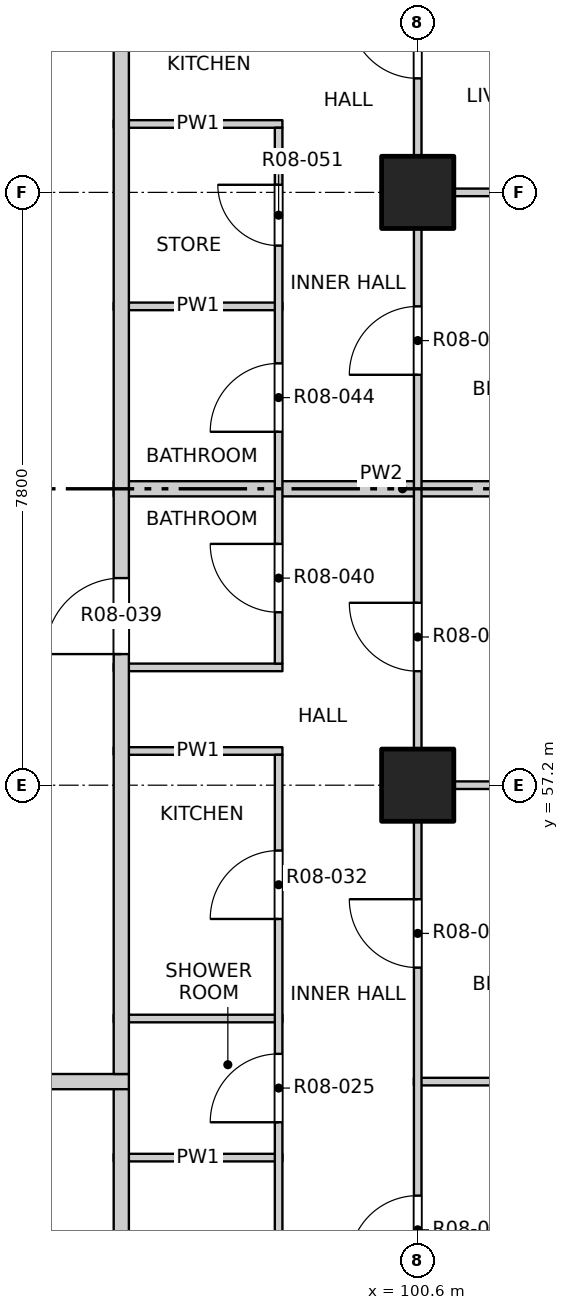
"""IFC4 building model, lengths in metres.
Left out: names, types, materials, properties, quantities, classifications, styles, units other than length and angle.
Written with IfcOpenShell. Run it as: python <this file> out.ifc"""

import sys

from ifc_helpers import new_model, si_unit, direction, frame, frame_2d, origin, origin_2d, place, context, subcontext, project, spatial, rectangle, extrude, element, fill, save


model = new_model("IFC4")
c1 = context("Model", 3, precision=1e-05, world=origin(), true_north=direction((0.0, 1.0)))
c2 = subcontext(c1, "Body", "Model", "MODEL_VIEW")
j1 = project(units=[si_unit("LENGTHUNIT", "METRE"), si_unit("PLANEANGLEUNIT", "RADIAN")], contexts=[c1])
p1 = place(None, origin())
s1 = spatial("IfcSite", under=j1, at=p1, CompositionType="ELEMENT")
p2 = place(p1, origin())
s2 = spatial("IfcBuilding", under=s1, at=p2, CompositionType="ELEMENT")
p3 = place(p2, frame((0.0, 0.0, 99.9)))
s3 = spatial("IfcBuildingStorey", under=s2, at=p3, CompositionType="ELEMENT", Elevation=99.9)
for number, where, z_axis, x_axis in (
    (1, (100.6, 57.2, -0.3), (0.0, 0.0, 1.0), (1.0, 0.0, 0.0)),
    (2, (100.6, 65.0, -0.3), (0.0, 0.0, 1.0), (1.0, 0.0, 0.0)),
):
    element("IfcColumn", number, at=place(p3, frame(where, z_axis=z_axis, x_axis=x_axis)), inside=s3, PredefinedType="COLUMN", context=c2, shape_type="SweptSolid", body=[
        extrude(rectangle(XDim=0.95, YDim=0.95, at=origin_2d()), origin(), (0.0, 0.0, 1.0), 3.45),
    ])
p4 = place(p3, frame((96.6, 52.3, 0.0), z_axis=(0.0, 0.0, 1.0), x_axis=(1.0, 0.0, 0.0)))
e3 = element("IfcWall", 3, at=p4, inside=s3, PredefinedType="PARTITIONING", context=c2, shape_type="SweptSolid", body=[
    extrude(rectangle(XDim=2.22, YDim=0.1, at=frame_2d((1.11, 0.0))), origin(), (0.0, 0.0, 1.0), 3.15),
])
p5 = place(p3, frame((73.2, 53.3, 0.0), z_axis=(0.0, 0.0, 1.0), x_axis=(1.0, 0.0, 0.0)))
e4 = element("IfcWall", 4, at=p5, inside=s3, PredefinedType="PARTITIONING", context=c2, shape_type="SweptSolid", body=[
    extrude(rectangle(XDim=23.6, YDim=0.2, at=frame_2d((11.8, 0.0))), origin(), (0.0, 0.0, 1.0), 3.15),
])
p6 = place(p5, frame((5.975, 0.0, 0.0)))
e5 = element("IfcOpeningElement", 5, at=p6, cuts=e4, PredefinedType="OPENING", context=c2, shape_type="SweptSolid", body=[
    extrude(rectangle(XDim=1.0, YDim=2.1, at=frame_2d((0.5, 1.05))), frame((0.0, 0.11, 0.0), z_axis=(0.0, -1.0, 0.0), x_axis=(1.0, 0.0, 0.0)), (0.0, 0.0, 1.0), 0.22),
])
p7 = place(p5, frame((18.075, 0.0, 0.0)))
e6 = element("IfcOpeningElement", 6, at=p7, cuts=e4, PredefinedType="OPENING", context=c2, shape_type="SweptSolid", body=[
    extrude(rectangle(XDim=1.0, YDim=2.1, at=frame_2d((0.5, 1.05))), frame((0.0, 0.11, 0.0), z_axis=(0.0, -1.0, 0.0), x_axis=(1.0, 0.0, 0.0)), (0.0, 0.0, 1.0), 0.22),
])
p8 = place(p3, frame((100.55, 53.3, 0.0), z_axis=(0.0, 0.0, 1.0), x_axis=(1.0, 0.0, 0.0)))
e7 = element("IfcWall", 7, at=p8, inside=s3, PredefinedType="PARTITIONING", context=c2, shape_type="SweptSolid", body=[
    extrude(rectangle(XDim=3.65, YDim=0.1, at=frame_2d((1.825, 0.0))), origin(), (0.0, 0.0, 1.0), 3.15),
])
p9 = place(p3, frame((96.6, 54.13, 0.0), z_axis=(0.0, 0.0, 1.0), x_axis=(1.0, 0.0, 0.0)))
e8 = element("IfcWall", 8, at=p9, inside=s3, PredefinedType="PARTITIONING", context=c2, shape_type="SweptSolid", body=[
    extrude(rectangle(XDim=2.22, YDim=0.1, at=frame_2d((1.11, 0.0))), origin(), (0.0, 0.0, 1.0), 3.15),
])
p10 = place(p3, frame((100.55, 57.2, 0.0), z_axis=(0.0, 0.0, 1.0), x_axis=(1.0, 0.0, 0.0)))
e9 = element("IfcWall", 9, at=p10, inside=s3, PredefinedType="PARTITIONING", context=c2, shape_type="SweptSolid", body=[
    extrude(rectangle(XDim=3.65, YDim=0.1, at=frame_2d((1.825, 0.0))), origin(), (0.0, 0.0, 1.0), 3.15),
])
for number, where, z_axis, x_axis in (
    (10, (96.6, 57.65, 0.0), (0.0, 0.0, 1.0), (1.0, 0.0, 0.0)),
    (11, (96.6, 58.75, 0.0), (0.0, 0.0, 1.0), (1.0, 0.0, 0.0)),
):
    element("IfcWall", number, at=place(p3, frame(where, z_axis=z_axis, x_axis=x_axis)), inside=s3, PredefinedType="PARTITIONING", context=c2, shape_type="SweptSolid", body=[
        extrude(rectangle(XDim=2.22, YDim=0.1, at=frame_2d((1.11, 0.0))), origin(), (0.0, 0.0, 1.0), 3.15),
    ])
p11 = place(p3, frame((96.6, 61.1, 0.0), z_axis=(0.0, 0.0, 1.0), x_axis=(1.0, 0.0, 0.0)))
e12 = element("IfcWall", 12, at=p11, inside=s3, PredefinedType="PARTITIONING", context=c2, shape_type="SweptSolid", body=[
    extrude(rectangle(XDim=7.6, YDim=0.2, at=frame_2d((3.8, 0.0))), origin(), (0.0, 0.0, 1.0), 2.55),
])
p12 = place(p3, frame((96.6, 63.5, 0.0), z_axis=(0.0, 0.0, 1.0), x_axis=(1.0, 0.0, 0.0)))
e13 = element("IfcWall", 13, at=p12, inside=s3, PredefinedType="PARTITIONING", context=c2, shape_type="SweptSolid", body=[
    extrude(rectangle(XDim=2.22, YDim=0.1, at=frame_2d((1.11, 0.0))), origin(), (0.0, 0.0, 1.0), 3.15),
])
p13 = place(p3, frame((100.55, 65.0, 0.0), z_axis=(0.0, 0.0, 1.0), x_axis=(1.0, 0.0, 0.0)))
e14 = element("IfcWall", 14, at=p13, inside=s3, PredefinedType="PARTITIONING", context=c2, shape_type="SweptSolid", body=[
    extrude(rectangle(XDim=3.65, YDim=0.1, at=frame_2d((1.825, 0.0))), origin(), (0.0, 0.0, 1.0), 3.15),
])
p14 = place(p3, frame((96.6, 65.9, 0.0), z_axis=(0.0, 0.0, 1.0), x_axis=(1.0, 0.0, 0.0)))
e15 = element("IfcWall", 15, at=p14, inside=s3, PredefinedType="PARTITIONING", context=c2, shape_type="SweptSolid", body=[
    extrude(rectangle(XDim=2.22, YDim=0.1, at=frame_2d((1.11, 0.0))), origin(), (0.0, 0.0, 1.0), 3.15),
])
p15 = place(p3, frame((96.7, 45.8, 0.0), z_axis=(0.0, 0.0, 1.0), x_axis=(0.0, 1.0, 0.0)))
e16 = element("IfcWall", 16, at=p15, inside=s3, PredefinedType="PARTITIONING", context=c2, shape_type="SweptSolid", body=[
    extrude(rectangle(XDim=7.4, YDim=0.2, at=frame_2d((3.7, 0.0))), origin(), (0.0, 0.0, 1.0), 3.15),
])
p16 = place(p3, frame((96.7, 53.4, 0.0), z_axis=(0.0, 0.0, 1.0), x_axis=(0.0, 1.0, 0.0)))
e17 = element("IfcWall", 17, at=p16, inside=s3, PredefinedType="PARTITIONING", context=c2, shape_type="SweptSolid", body=[
    extrude(rectangle(XDim=30.8, YDim=0.2, at=frame_2d((15.4, 0.0))), origin(), (0.0, 0.0, 1.0), 3.15),
])
p17 = place(p16, frame((5.525, 0.0, 0.0)))
e18 = element("IfcOpeningElement", 18, at=p17, cuts=e17, PredefinedType="OPENING", context=c2, shape_type="SweptSolid", body=[
    extrude(rectangle(XDim=1.0, YDim=2.1, at=frame_2d((0.5, 1.05))), frame((0.0, 0.11, 0.0), z_axis=(0.0, -1.0, 0.0), x_axis=(1.0, 0.0, 0.0)), (0.0, 0.0, 1.0), 0.22),
])
p18 = place(p16, frame((13.775, 0.0, 0.0)))
e19 = element("IfcOpeningElement", 19, at=p18, cuts=e17, PredefinedType="OPENING", context=c2, shape_type="SweptSolid", body=[
    extrude(rectangle(XDim=1.0, YDim=2.1, at=frame_2d((0.5, 1.05))), frame((0.0, 0.11, 0.0), z_axis=(0.0, -1.0, 0.0), x_axis=(1.0, 0.0, 0.0)), (0.0, 0.0, 1.0), 0.22),
])
p19 = place(p16, frame((22.125, 0.0, 0.0)))
e20 = element("IfcOpeningElement", 20, at=p19, cuts=e17, PredefinedType="OPENING", context=c2, shape_type="SweptSolid", body=[
    extrude(rectangle(XDim=1.0, YDim=2.1, at=frame_2d((0.5, 1.05))), frame((0.0, 0.11, 0.0), z_axis=(0.0, -1.0, 0.0), x_axis=(1.0, 0.0, 0.0)), (0.0, 0.0, 1.0), 0.22),
])
p20 = place(p3, frame((98.77, 49.45, 0.0), z_axis=(0.0, 0.0, 1.0), x_axis=(0.0, 1.0, 0.0)))
e21 = element("IfcWall", 21, at=p20, inside=s3, PredefinedType="PARTITIONING", context=c2, shape_type="SweptSolid", body=[
    extrude(rectangle(XDim=8.15, YDim=0.1, at=frame_2d((4.075, 0.0))), origin(), (0.0, 0.0, 1.0), 3.15),
])
p21 = place(p20, frame((1.0, 0.0, 0.0)))
e22 = element("IfcOpeningElement", 22, at=p21, cuts=e21, PredefinedType="OPENING", context=c2, shape_type="SweptSolid", body=[
    extrude(rectangle(XDim=0.8, YDim=2.1, at=frame_2d((0.4, 1.05))), frame((0.0, 0.06, 0.0), z_axis=(0.0, -1.0, 0.0), x_axis=(1.0, 0.0, 0.0)), (0.0, 0.0, 1.0), 0.12),
])
p22 = place(p20, frame((3.315, 0.0, 0.0)))
e23 = element("IfcOpeningElement", 23, at=p22, cuts=e21, PredefinedType="OPENING", context=c2, shape_type="SweptSolid", body=[
    extrude(rectangle(XDim=0.9, YDim=2.1, at=frame_2d((0.45, 1.05))), frame((0.0, 0.06, 0.0), z_axis=(0.0, -1.0, 0.0), x_axis=(1.0, 0.0, 0.0)), (0.0, 0.0, 1.0), 0.12),
])
p23 = place(p20, frame((5.99, 0.0, 0.0)))
e24 = element("IfcOpeningElement", 24, at=p23, cuts=e21, PredefinedType="OPENING", context=c2, shape_type="SweptSolid", body=[
    extrude(rectangle(XDim=0.9, YDim=2.1, at=frame_2d((0.45, 1.05))), frame((0.0, 0.06, 0.0), z_axis=(0.0, -1.0, 0.0), x_axis=(1.0, 0.0, 0.0)), (0.0, 0.0, 1.0), 0.12),
])
p24 = place(p3, frame((98.77, 58.8, 0.0), z_axis=(0.0, 0.0, 1.0), x_axis=(0.0, 1.0, 0.0)))
e25 = element("IfcWall", 25, at=p24, inside=s3, PredefinedType="PARTITIONING", context=c2, shape_type="SweptSolid", body=[
    extrude(rectangle(XDim=7.05, YDim=0.1, at=frame_2d((3.525, 0.0))), origin(), (0.0, 0.0, 1.0), 3.15),
])
p25 = place(p24, frame((0.675, 0.0, 0.0)))
e26 = element("IfcOpeningElement", 26, at=p25, cuts=e25, PredefinedType="OPENING", context=c2, shape_type="SweptSolid", body=[
    extrude(rectangle(XDim=0.9, YDim=2.1, at=frame_2d((0.45, 1.05))), frame((0.0, 0.06, 0.0), z_axis=(0.0, -1.0, 0.0), x_axis=(1.0, 0.0, 0.0)), (0.0, 0.0, 1.0), 0.12),
])
p26 = place(p24, frame((3.05, 0.0, 0.0)))
e27 = element("IfcOpeningElement", 27, at=p26, cuts=e25, PredefinedType="OPENING", context=c2, shape_type="SweptSolid", body=[
    extrude(rectangle(XDim=0.9, YDim=2.1, at=frame_2d((0.45, 1.05))), frame((0.0, 0.06, 0.0), z_axis=(0.0, -1.0, 0.0), x_axis=(1.0, 0.0, 0.0)), (0.0, 0.0, 1.0), 0.12),
])
p27 = place(p24, frame((5.5, 0.0, 0.0)))
e28 = element("IfcOpeningElement", 28, at=p27, cuts=e25, PredefinedType="OPENING", context=c2, shape_type="SweptSolid", body=[
    extrude(rectangle(XDim=0.8, YDim=2.1, at=frame_2d((0.4, 1.05))), frame((0.0, 0.06, 0.0), z_axis=(0.0, -1.0, 0.0), x_axis=(1.0, 0.0, 0.0)), (0.0, 0.0, 1.0), 0.12),
])
p28 = place(p3, frame((100.6, 45.8, 0.0), z_axis=(0.0, 0.0, 1.0), x_axis=(0.0, 1.0, 0.0)))
e29 = element("IfcWall", 29, at=p28, inside=s3, PredefinedType="PARTITIONING", context=c2, shape_type="SweptSolid", body=[
    extrude(rectangle(XDim=38.4, YDim=0.1, at=frame_2d((19.2, 0.0))), origin(), (0.0, 0.0, 1.0), 3.15),
])
p29 = place(p28, frame((1.05, 0.0, 0.0)))
e30 = element("IfcOpeningElement", 30, at=p29, cuts=e29, PredefinedType="OPENING", context=c2, shape_type="SweptSolid", body=[
    extrude(rectangle(XDim=1.2, YDim=2.1, at=frame_2d((0.6, 1.05))), frame((0.0, 0.06, 0.0), z_axis=(0.0, -1.0, 0.0), x_axis=(1.0, 0.0, 0.0)), (0.0, 0.0, 1.0), 0.12),
])
p30 = place(p28, frame((5.1, 0.0, 0.0)))
e31 = element("IfcOpeningElement", 31, at=p30, cuts=e29, PredefinedType="OPENING", context=c2, shape_type="SweptSolid", body=[
    extrude(rectangle(XDim=0.9, YDim=2.1, at=frame_2d((0.45, 1.05))), frame((0.0, 0.06, 0.0), z_axis=(0.0, -1.0, 0.0), x_axis=(1.0, 0.0, 0.0)), (0.0, 0.0, 1.0), 0.12),
])
p31 = place(p28, frame((9.0, 0.0, 0.0)))
e32 = element("IfcOpeningElement", 32, at=p31, cuts=e29, PredefinedType="OPENING", context=c2, shape_type="SweptSolid", body=[
    extrude(rectangle(XDim=0.9, YDim=2.1, at=frame_2d((0.45, 1.05))), frame((0.0, 0.06, 0.0), z_axis=(0.0, -1.0, 0.0), x_axis=(1.0, 0.0, 0.0)), (0.0, 0.0, 1.0), 0.12),
])
p32 = place(p28, frame((12.9, 0.0, 0.0)))
e33 = element("IfcOpeningElement", 33, at=p32, cuts=e29, PredefinedType="OPENING", context=c2, shape_type="SweptSolid", body=[
    extrude(rectangle(XDim=0.9, YDim=2.1, at=frame_2d((0.45, 1.05))), frame((0.0, 0.06, 0.0), z_axis=(0.0, -1.0, 0.0), x_axis=(1.0, 0.0, 0.0)), (0.0, 0.0, 1.0), 0.12),
])
p33 = place(p28, frame((16.8, 0.0, 0.0)))
e34 = element("IfcOpeningElement", 34, at=p33, cuts=e29, PredefinedType="OPENING", context=c2, shape_type="SweptSolid", body=[
    extrude(rectangle(XDim=0.9, YDim=2.1, at=frame_2d((0.45, 1.05))), frame((0.0, 0.06, 0.0), z_axis=(0.0, -1.0, 0.0), x_axis=(1.0, 0.0, 0.0)), (0.0, 0.0, 1.0), 0.12),
])
p34 = place(p28, frame((20.7, 0.0, 0.0)))
e35 = element("IfcOpeningElement", 35, at=p34, cuts=e29, PredefinedType="OPENING", context=c2, shape_type="SweptSolid", body=[
    extrude(rectangle(XDim=0.9, YDim=2.1, at=frame_2d((0.45, 1.05))), frame((0.0, 0.06, 0.0), z_axis=(0.0, -1.0, 0.0), x_axis=(1.0, 0.0, 0.0)), (0.0, 0.0, 1.0), 0.12),
])
p35 = place(p28, frame((24.6, 0.0, 0.0)))
e36 = element("IfcOpeningElement", 36, at=p35, cuts=e29, PredefinedType="OPENING", context=c2, shape_type="SweptSolid", body=[
    extrude(rectangle(XDim=0.9, YDim=2.1, at=frame_2d((0.45, 1.05))), frame((0.0, 0.06, 0.0), z_axis=(0.0, -1.0, 0.0), x_axis=(1.0, 0.0, 0.0)), (0.0, 0.0, 1.0), 0.12),
])
p36 = place(p28, frame((28.5, 0.0, 0.0)))
e37 = element("IfcOpeningElement", 37, at=p36, cuts=e29, PredefinedType="OPENING", context=c2, shape_type="SweptSolid", body=[
    extrude(rectangle(XDim=0.9, YDim=2.1, at=frame_2d((0.45, 1.05))), frame((0.0, 0.06, 0.0), z_axis=(0.0, -1.0, 0.0), x_axis=(1.0, 0.0, 0.0)), (0.0, 0.0, 1.0), 0.12),
])
p37 = place(p28, frame((32.4, 0.0, 0.0)))
e38 = element("IfcOpeningElement", 38, at=p37, cuts=e29, PredefinedType="OPENING", context=c2, shape_type="SweptSolid", body=[
    extrude(rectangle(XDim=0.9, YDim=2.1, at=frame_2d((0.45, 1.05))), frame((0.0, 0.06, 0.0), z_axis=(0.0, -1.0, 0.0), x_axis=(1.0, 0.0, 0.0)), (0.0, 0.0, 1.0), 0.12),
])
p38 = place(p28, frame((36.15, 0.0, 0.0)))
e39 = element("IfcOpeningElement", 39, at=p38, cuts=e29, PredefinedType="OPENING", context=c2, shape_type="SweptSolid", body=[
    extrude(rectangle(XDim=1.2, YDim=2.1, at=frame_2d((0.6, 1.05))), frame((0.0, 0.06, 0.0), z_axis=(0.0, -1.0, 0.0), x_axis=(1.0, 0.0, 0.0)), (0.0, 0.0, 1.0), 0.12),
])
p39 = place(p30, origin())
e40 = element("IfcDoor", 40, at=p39, inside=s3, OperationType="SINGLE_SWING_LEFT", PredefinedType="DOOR", context=c2, shape_type="SweptSolid", body=[
    extrude(rectangle(XDim=0.9, YDim=2.1, at=frame_2d((0.45, 1.05))), frame((0.0, 0.025, 0.0), z_axis=(0.0, -1.0, 0.0), x_axis=(1.0, 0.0, 0.0)), (0.0, 0.0, 1.0), 0.05),
])
fill(e31, e40)
p40 = place(p22, origin())
e41 = element("IfcDoor", 41, at=p40, inside=s3, OperationType="SINGLE_SWING_LEFT", PredefinedType="DOOR", context=c2, shape_type="SweptSolid", body=[
    extrude(rectangle(XDim=0.9, YDim=2.1, at=frame_2d((0.45, 1.05))), frame((0.0, 0.025, 0.0), z_axis=(0.0, -1.0, 0.0), x_axis=(1.0, 0.0, 0.0)), (0.0, 0.0, 1.0), 0.05),
])
fill(e23, e41)
p41 = place(p31, origin())
e42 = element("IfcDoor", 42, at=p41, inside=s3, OperationType="SINGLE_SWING_RIGHT", PredefinedType="DOOR", context=c2, shape_type="SweptSolid", body=[
    extrude(rectangle(XDim=0.9, YDim=2.1, at=frame_2d((0.45, 1.05))), frame((0.0, 0.025, 0.0), z_axis=(0.0, -1.0, 0.0), x_axis=(1.0, 0.0, 0.0)), (0.0, 0.0, 1.0), 0.05),
])
fill(e32, e42)
p42 = place(p23, origin())
e43 = element("IfcDoor", 43, at=p42, inside=s3, OperationType="SINGLE_SWING_LEFT", PredefinedType="DOOR", context=c2, shape_type="SweptSolid", body=[
    extrude(rectangle(XDim=0.9, YDim=2.1, at=frame_2d((0.45, 1.05))), frame((0.0, 0.025, 0.0), z_axis=(0.0, -1.0, 0.0), x_axis=(1.0, 0.0, 0.0)), (0.0, 0.0, 1.0), 0.05),
])
fill(e24, e43)
p43 = place(p32, origin())
e44 = element("IfcDoor", 44, at=p43, inside=s3, OperationType="SINGLE_SWING_RIGHT", PredefinedType="DOOR", context=c2, shape_type="SweptSolid", body=[
    extrude(rectangle(XDim=0.9, YDim=2.1, at=frame_2d((0.45, 1.05))), frame((0.0, 0.025, 0.0), z_axis=(0.0, -1.0, 0.0), x_axis=(1.0, 0.0, 0.0)), (0.0, 0.0, 1.0), 0.05),
])
fill(e33, e44)
p44 = place(p17, origin())
e45 = element("IfcDoor", 45, at=p44, inside=s3, OperationType="SINGLE_SWING_LEFT", PredefinedType="DOOR", context=c2, shape_type="SweptSolid", body=[
    extrude(rectangle(XDim=1.0, YDim=2.1, at=frame_2d((0.5, 1.05))), frame((0.0, 0.025, 0.0), z_axis=(0.0, -1.0, 0.0), x_axis=(1.0, 0.0, 0.0)), (0.0, 0.0, 1.0), 0.05),
])
fill(e18, e45)
p45 = place(p25, origin())
e46 = element("IfcDoor", 46, at=p45, inside=s3, OperationType="SINGLE_SWING_RIGHT", PredefinedType="DOOR", context=c2, shape_type="SweptSolid", body=[
    extrude(rectangle(XDim=0.9, YDim=2.1, at=frame_2d((0.45, 1.05))), frame((0.0, 0.025, 0.0), z_axis=(0.0, -1.0, 0.0), x_axis=(1.0, 0.0, 0.0)), (0.0, 0.0, 1.0), 0.05),
])
fill(e26, e46)
p46 = place(p26, origin())
e47 = element("IfcDoor", 47, at=p46, inside=s3, OperationType="SINGLE_SWING_LEFT", PredefinedType="DOOR", context=c2, shape_type="SweptSolid", body=[
    extrude(rectangle(XDim=0.9, YDim=2.1, at=frame_2d((0.45, 1.05))), frame((0.0, 0.025, 0.0), z_axis=(0.0, -1.0, 0.0), x_axis=(1.0, 0.0, 0.0)), (0.0, 0.0, 1.0), 0.05),
])
fill(e27, e47)
p47 = place(p33, origin())
e48 = element("IfcDoor", 48, at=p47, inside=s3, OperationType="SINGLE_SWING_LEFT", PredefinedType="DOOR", context=c2, shape_type="SweptSolid", body=[
    extrude(rectangle(XDim=0.9, YDim=2.1, at=frame_2d((0.45, 1.05))), frame((0.0, 0.025, 0.0), z_axis=(0.0, -1.0, 0.0), x_axis=(1.0, 0.0, 0.0)), (0.0, 0.0, 1.0), 0.05),
])
fill(e34, e48)
p48 = place(p27, origin())
e49 = element("IfcDoor", 49, at=p48, inside=s3, OperationType="SINGLE_SWING_RIGHT", PredefinedType="DOOR", context=c2, shape_type="SweptSolid", body=[
    extrude(rectangle(XDim=0.8, YDim=2.1, at=frame_2d((0.4, 1.05))), frame((0.0, 0.025, 0.0), z_axis=(0.0, -1.0, 0.0), x_axis=(1.0, 0.0, 0.0)), (0.0, 0.0, 1.0), 0.05),
])
fill(e28, e49)
p49 = place(p34, origin())
e50 = element("IfcDoor", 50, at=p49, inside=s3, OperationType="SINGLE_SWING_RIGHT", PredefinedType="DOOR", context=c2, shape_type="SweptSolid", body=[
    extrude(rectangle(XDim=0.9, YDim=2.1, at=frame_2d((0.45, 1.05))), frame((0.0, 0.025, 0.0), z_axis=(0.0, -1.0, 0.0), x_axis=(1.0, 0.0, 0.0)), (0.0, 0.0, 1.0), 0.05),
])
fill(e35, e50)
save(model, sys.argv[1])
